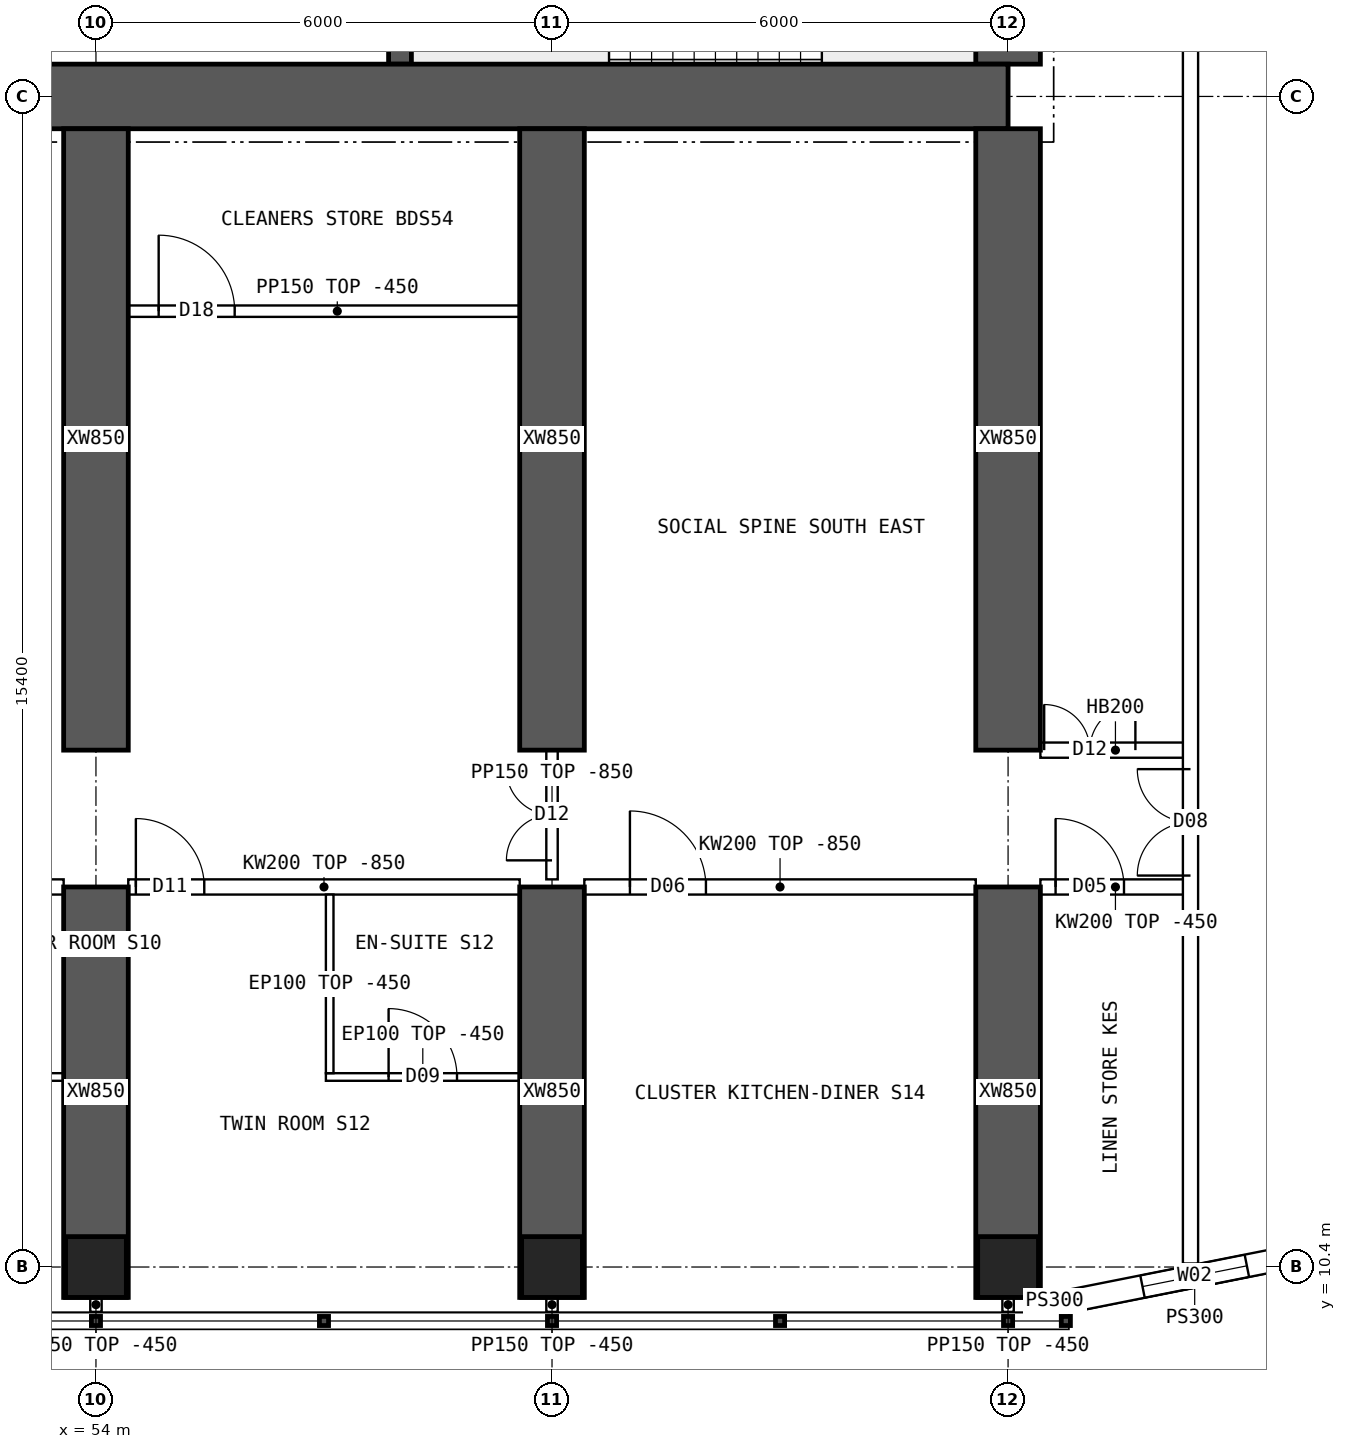
"""IFC4 building model, lengths in metres.
Left out: names, types, materials, properties, quantities, classifications, styles, units other than length and angle.
Written with IfcOpenShell. Run it as: python <this file> out.ifc"""

import sys

from ifc_helpers import new_model, si_unit, direction, frame, frame_2d, origin, origin_2d, place, context, subcontext, project, spatial, polyline, rectangle, hollow_rectangle, outline, extrude, element, fill, save


model = new_model("IFC4")
c1 = context("Model", 3, precision=1e-05, world=origin(), true_north=direction((0.0, 1.0)))
c2 = subcontext(c1, "Body", "Model", "MODEL_VIEW")
j1 = project(units=[si_unit("LENGTHUNIT", "METRE"), si_unit("PLANEANGLEUNIT", "RADIAN")], contexts=[c1])
p1 = place(None, origin())
s1 = spatial("IfcSite", under=j1, at=p1, CompositionType="ELEMENT")
p2 = place(p1, origin())
s2 = spatial("IfcBuilding", under=s1, at=p2, CompositionType="ELEMENT")
p3 = place(p2, frame((0.0, 0.0, 144.85)))
s3 = spatial("IfcBuildingStorey", under=s2, at=p3, CompositionType="ELEMENT", Elevation=144.85)
for number, where, z_axis, x_axis in (
    (1, (54.0, 10.4, 0.0), (0.0, 0.0, 1.0), (1.0, 0.0, 0.0)),
    (2, (60.0, 10.4, 0.0), (0.0, 0.0, 1.0), (1.0, 0.0, 0.0)),
    (3, (66.0, 10.4, 0.0), (0.0, 0.0, 1.0), (1.0, 0.0, 0.0)),
):
    element("IfcColumn", number, at=place(p3, frame(where, z_axis=z_axis, x_axis=x_axis)), inside=s3, PredefinedType="COLUMN", context=c2, shape_type="SweptSolid", body=[
        extrude(hollow_rectangle(XDim=0.8, YDim=0.8, WallThickness=0.08, at=origin_2d()), origin(), (0.0, 0.0, 1.0), 3.75),
    ])
p4 = place(p3, frame((18.0, 25.8, 0.0), z_axis=(0.0, 0.0, 1.0), x_axis=(1.0, 0.0, 0.0)))
e4 = element("IfcWall", 4, at=p4, inside=s3, PredefinedType="SHEAR", context=c2, shape_type="SweptSolid", body=[
    extrude(rectangle(XDim=48.0, YDim=0.85, at=frame_2d((24.0, 0.0))), origin(), (0.0, 0.0, 1.0), 3.75),
])
p5 = place(p3, frame((66.0, 26.225, 0.0), z_axis=(0.0, 0.0, 1.0), x_axis=(0.0, 1.0, 0.0)))
e5 = element("IfcWall", 5, at=p5, inside=s3, PredefinedType="SHEAR", context=c2, shape_type="SweptSolid", body=[
    extrude(rectangle(XDim=11.55, YDim=0.85, at=frame_2d((5.775, 0.0))), origin(), (0.0, 0.0, 1.0), 3.75),
])
p6 = place(p5, frame((5.075, 0.0, 0.0)))
e6 = element("IfcOpeningElement", 6, at=p6, cuts=e5, PredefinedType="OPENING", context=c2, shape_type="SweptSolid", body=[
    extrude(rectangle(XDim=1.2, YDim=2.1, at=frame_2d((0.6, 1.05))), frame((0.0, 0.435, 0.0), z_axis=(0.0, -1.0, 0.0), x_axis=(1.0, 0.0, 0.0)), (0.0, 0.0, 1.0), 0.87),
])
p7 = place(p3, frame((58.0, 26.225, 0.0), z_axis=(0.0, 0.0, 1.0), x_axis=(0.0, 1.0, 0.0)))
e7 = element("IfcWall", 7, at=p7, inside=s3, PredefinedType="SHEAR", context=c2, shape_type="SweptSolid", body=[
    extrude(rectangle(XDim=4.025, YDim=0.3, at=frame_2d((2.012, 0.0))), origin(), (0.0, 0.0, 1.0), 3.75),
])
p8 = place(p3, frame((54.0, 10.0, 0.0), z_axis=(0.0, 0.0, 1.0), x_axis=(0.0, 1.0, 0.0)))
e8 = element("IfcWall", 8, at=p8, inside=s3, PredefinedType="SHEAR", context=c2, shape_type="SweptSolid", body=[
    extrude(rectangle(XDim=5.4, YDim=0.85, at=frame_2d((2.7, 0.0))), origin(), (0.0, 0.0, 1.0), 3.75),
])
p9 = place(p3, frame((54.0, 17.2, 0.0), z_axis=(0.0, 0.0, 1.0), x_axis=(0.0, 1.0, 0.0)))
e9 = element("IfcWall", 9, at=p9, inside=s3, PredefinedType="SHEAR", context=c2, shape_type="SweptSolid", body=[
    extrude(rectangle(XDim=8.175, YDim=0.85, at=frame_2d((4.087, 0.0))), origin(), (0.0, 0.0, 1.0), 3.75),
])
p10 = place(p3, frame((60.0, 10.0, 0.0), z_axis=(0.0, 0.0, 1.0), x_axis=(0.0, 1.0, 0.0)))
e10 = element("IfcWall", 10, at=p10, inside=s3, PredefinedType="SHEAR", context=c2, shape_type="SweptSolid", body=[
    extrude(rectangle(XDim=5.4, YDim=0.85, at=frame_2d((2.7, 0.0))), origin(), (0.0, 0.0, 1.0), 3.75),
])
p11 = place(p3, frame((60.0, 17.2, 0.0), z_axis=(0.0, 0.0, 1.0), x_axis=(0.0, 1.0, 0.0)))
e11 = element("IfcWall", 11, at=p11, inside=s3, PredefinedType="SHEAR", context=c2, shape_type="SweptSolid", body=[
    extrude(rectangle(XDim=8.175, YDim=0.85, at=frame_2d((4.087, 0.0))), origin(), (0.0, 0.0, 1.0), 3.75),
])
p12 = place(p3, frame((66.0, 10.0, 0.0), z_axis=(0.0, 0.0, 1.0), x_axis=(0.0, 1.0, 0.0)))
e12 = element("IfcWall", 12, at=p12, inside=s3, PredefinedType="SHEAR", context=c2, shape_type="SweptSolid", body=[
    extrude(rectangle(XDim=5.4, YDim=0.85, at=frame_2d((2.7, 0.0))), origin(), (0.0, 0.0, 1.0), 3.75),
])
p13 = place(p3, frame((66.0, 17.2, 0.0), z_axis=(0.0, 0.0, 1.0), x_axis=(0.0, 1.0, 0.0)))
e13 = element("IfcWall", 13, at=p13, inside=s3, PredefinedType="SHEAR", context=c2, shape_type="SweptSolid", body=[
    extrude(rectangle(XDim=8.175, YDim=0.85, at=frame_2d((4.087, 0.0))), origin(), (0.0, 0.0, 1.0), 3.75),
])
p14 = place(p3, frame((66.8, 9.95, 0.0), z_axis=(0.0, 0.0, 1.0), x_axis=(0.98078325777, 0.195100490205, 0.0)))
e14 = element("IfcWall", 14, at=p14, inside=s3, PredefinedType="SOLIDWALL", context=c2, shape_type="SweptSolid", body=[
    extrude(outline(polyline([(-0.03, -0.15), (3.405, -0.15), (3.345, 0.15), (0.03, 0.15), (-0.03, -0.15)])), origin(), (0.0, 0.0, 1.0), 3.3),
])
p15 = place(p14, frame((0.988, 0.0, 0.9)))
e15 = element("IfcOpeningElement", 15, at=p15, cuts=e14, PredefinedType="OPENING", context=c2, shape_type="SweptSolid", body=[
    extrude(rectangle(XDim=1.4, YDim=1.8, at=frame_2d((0.7, 0.9))), frame((0.0, 0.16, 0.0), z_axis=(0.0, -1.0, 0.0), x_axis=(1.0, 0.0, 0.0)), (0.0, 0.0, 1.0), 0.32),
])
p16 = place(p3, frame((66.8, 9.95, 0.0), z_axis=(0.0, 0.0, 1.0), x_axis=(-1.0, 0.0, 0.0)))
e16 = element("IfcWall", 16, at=p16, inside=s3, PredefinedType="SOLIDWALL", context=c2, shape_type="SweptSolid", body=[
    extrude(rectangle(XDim=0.375, YDim=0.3, at=frame_2d((0.188, 0.0))), origin(), (0.0, 0.0, 1.0), 3.3),
])
p17 = place(p3, frame((48.425, 15.4, 0.0), z_axis=(0.0, 0.0, 1.0), x_axis=(1.0, 0.0, 0.0)))
e17 = element("IfcWall", 17, at=p17, inside=s3, PredefinedType="SOLIDWALL", context=c2, shape_type="SweptSolid", body=[
    extrude(outline(polyline([(0.0, 0.0), (5.15, 0.0), (5.15, 2.9), (0.0, 2.9), (0.0, 0.0)])), frame((0.0, 0.1, 0.0), z_axis=(0.0, -1.0, 0.0), x_axis=(1.0, 0.0, 0.0)), (0.0, 0.0, 1.0), 0.2),
])
p18 = place(p17, frame((2.3, 0.0, 0.0)))
e18 = element("IfcOpeningElement", 18, at=p18, cuts=e17, PredefinedType="OPENING", context=c2, shape_type="SweptSolid", body=[
    extrude(rectangle(XDim=0.9, YDim=2.1, at=frame_2d((0.45, 1.05))), frame((0.0, 0.11, 0.0), z_axis=(0.0, -1.0, 0.0), x_axis=(1.0, 0.0, 0.0)), (0.0, 0.0, 1.0), 0.22),
])
p19 = place(p3, frame((54.425, 15.4, 0.0), z_axis=(0.0, 0.0, 1.0), x_axis=(1.0, 0.0, 0.0)))
e19 = element("IfcWall", 19, at=p19, inside=s3, PredefinedType="SOLIDWALL", context=c2, shape_type="SweptSolid", body=[
    extrude(outline(polyline([(0.0, 0.0), (5.15, 0.0), (5.15, 2.9), (0.0, 2.9), (0.0, 0.0)])), frame((0.0, 0.1, 0.0), z_axis=(0.0, -1.0, 0.0), x_axis=(1.0, 0.0, 0.0)), (0.0, 0.0, 1.0), 0.2),
])
p20 = place(p19, frame((0.1, 0.0, 0.0)))
e20 = element("IfcOpeningElement", 20, at=p20, cuts=e19, PredefinedType="OPENING", context=c2, shape_type="SweptSolid", body=[
    extrude(rectangle(XDim=0.9, YDim=2.1, at=frame_2d((0.45, 1.05))), frame((0.0, 0.11, 0.0), z_axis=(0.0, -1.0, 0.0), x_axis=(1.0, 0.0, 0.0)), (0.0, 0.0, 1.0), 0.22),
])
p21 = place(p3, frame((60.425, 15.4, 0.0), z_axis=(0.0, 0.0, 1.0), x_axis=(1.0, 0.0, 0.0)))
e21 = element("IfcWall", 21, at=p21, inside=s3, PredefinedType="SOLIDWALL", context=c2, shape_type="SweptSolid", body=[
    extrude(outline(polyline([(0.0, 0.0), (5.15, 0.0), (5.15, 2.9), (0.0, 2.9), (0.0, 0.0)])), frame((0.0, 0.1, 0.0), z_axis=(0.0, -1.0, 0.0), x_axis=(1.0, 0.0, 0.0)), (0.0, 0.0, 1.0), 0.2),
])
p22 = place(p21, frame((0.6, 0.0, 0.0)))
e22 = element("IfcOpeningElement", 22, at=p22, cuts=e21, PredefinedType="OPENING", context=c2, shape_type="SweptSolid", body=[
    extrude(rectangle(XDim=1.0, YDim=2.1, at=frame_2d((0.5, 1.05))), frame((0.0, 0.11, 0.0), z_axis=(0.0, -1.0, 0.0), x_axis=(1.0, 0.0, 0.0)), (0.0, 0.0, 1.0), 0.22),
])
p23 = place(p3, frame((66.425, 15.4, 0.0), z_axis=(0.0, 0.0, 1.0), x_axis=(1.0, 0.0, 0.0)))
e23 = element("IfcWall", 23, at=p23, inside=s3, PredefinedType="SOLIDWALL", context=c2, shape_type="SweptSolid", body=[
    extrude(rectangle(XDim=1.975, YDim=0.2, at=frame_2d((0.987, 0.0))), origin(), (0.0, 0.0, 1.0), 3.3),
])
p24 = place(p23, frame((0.2, 0.0, 0.0)))
e24 = element("IfcOpeningElement", 24, at=p24, cuts=e23, PredefinedType="OPENING", context=c2, shape_type="SweptSolid", body=[
    extrude(rectangle(XDim=0.9, YDim=2.1, at=frame_2d((0.45, 1.05))), frame((0.0, 0.11, 0.0), z_axis=(0.0, -1.0, 0.0), x_axis=(1.0, 0.0, 0.0)), (0.0, 0.0, 1.0), 0.22),
])
p25 = place(p3, frame((66.425, 17.2, 0.0), z_axis=(0.0, 0.0, 1.0), x_axis=(1.0, 0.0, 0.0)))
e25 = element("IfcWall", 25, at=p25, inside=s3, PredefinedType="SOLIDWALL", context=c2, shape_type="SweptSolid", body=[
    extrude(rectangle(XDim=1.975, YDim=0.2, at=frame_2d((0.987, 0.0))), origin(), (0.0, 0.0, 1.0), 3.3),
])
p26 = place(p25, frame((0.05, 0.0, 0.0)))
e26 = element("IfcOpeningElement", 26, at=p26, cuts=e25, PredefinedType="OPENING", context=c2, shape_type="SweptSolid", body=[
    extrude(rectangle(XDim=1.2, YDim=2.1, at=frame_2d((0.6, 1.05))), frame((0.0, 0.11, 0.0), z_axis=(0.0, -1.0, 0.0), x_axis=(1.0, 0.0, 0.0)), (0.0, 0.0, 1.0), 0.22),
])
p27 = place(p3, frame((53.575, 12.9, 0.0), z_axis=(0.0, 0.0, 1.0), x_axis=(-1.0, 0.0, 0.0)))
e27 = element("IfcWall", 27, at=p27, inside=s3, PredefinedType="PARTITIONING", context=c2, shape_type="SweptSolid", body=[
    extrude(rectangle(XDim=3.0, YDim=0.1, at=frame_2d((1.5, 0.0))), origin(), (0.0, 0.0, 1.0), 3.3),
])
p28 = place(p27, frame((1.95, 0.0, 0.0)))
e28 = element("IfcOpeningElement", 28, at=p28, cuts=e27, PredefinedType="OPENING", context=c2, shape_type="SweptSolid", body=[
    extrude(rectangle(XDim=0.8, YDim=2.1, at=frame_2d((0.4, 1.05))), frame((0.0, 0.06, 0.0), z_axis=(0.0, -1.0, 0.0), x_axis=(1.0, 0.0, 0.0)), (0.0, 0.0, 1.0), 0.12),
])
p29 = place(p3, frame((59.575, 12.9, 0.0), z_axis=(0.0, 0.0, 1.0), x_axis=(-1.0, 0.0, 0.0)))
e29 = element("IfcWall", 29, at=p29, inside=s3, PredefinedType="PARTITIONING", context=c2, shape_type="SweptSolid", body=[
    extrude(rectangle(XDim=2.55, YDim=0.1, at=frame_2d((1.275, 0.0))), origin(), (0.0, 0.0, 1.0), 3.3),
])
p30 = place(p29, frame((0.825, 0.0, 0.0)))
e30 = element("IfcOpeningElement", 30, at=p30, cuts=e29, PredefinedType="OPENING", context=c2, shape_type="SweptSolid", body=[
    extrude(rectangle(XDim=0.9, YDim=2.1, at=frame_2d((0.45, 1.05))), frame((0.0, 0.06, 0.0), z_axis=(0.0, -1.0, 0.0), x_axis=(1.0, 0.0, 0.0)), (0.0, 0.0, 1.0), 0.12),
])
p31 = place(p3, frame((57.075, 12.95, 0.0), z_axis=(0.0, 0.0, 1.0), x_axis=(0.0, 1.0, 0.0)))
e31 = element("IfcWall", 31, at=p31, inside=s3, PredefinedType="PARTITIONING", context=c2, shape_type="SweptSolid", body=[
    extrude(outline(polyline([(0.0, 0.0), (2.35, 0.0), (2.35, 2.9), (2.302, 2.9), (2.3, 3.3), (0.0, 3.3), (0.0, 0.0)])), frame((0.0, 0.05, 0.0), z_axis=(0.0, -1.0, 0.0), x_axis=(1.0, 0.0, 0.0)), (0.0, 0.0, 1.0), 0.1),
])
p32 = place(p3, frame((54.425, 22.975, 0.0), z_axis=(0.0, 0.0, 1.0), x_axis=(1.0, 0.0, 0.0)))
e32 = element("IfcWall", 32, at=p32, inside=s3, PredefinedType="PARTITIONING", context=c2, shape_type="SweptSolid", body=[
    extrude(rectangle(XDim=5.5, YDim=0.15, at=frame_2d((2.75, 0.0))), origin(), (0.0, 0.0, 1.0), 3.3),
])
p33 = place(p32, frame((0.4, 0.0, 0.0)))
e33 = element("IfcOpeningElement", 33, at=p33, cuts=e32, PredefinedType="OPENING", context=c2, shape_type="SweptSolid", body=[
    extrude(rectangle(XDim=1.0, YDim=2.1, at=frame_2d((0.5, 1.05))), frame((0.0, 0.085, 0.0), z_axis=(0.0, -1.0, 0.0), x_axis=(1.0, 0.0, 0.0)), (0.0, 0.0, 1.0), 0.17),
])
p34 = place(p3, frame((60.0, 15.5, 0.0), z_axis=(0.0, 0.0, 1.0), x_axis=(0.0, 1.0, 0.0)))
e34 = element("IfcWall", 34, at=p34, inside=s3, PredefinedType="PARTITIONING", context=c2, shape_type="SweptSolid", body=[
    extrude(outline(polyline([(0.0, 0.0), (1.7, 0.0), (1.7, 2.9), (0.0, 2.9), (0.0, 0.0)])), frame((0.0, 0.075, 0.0), z_axis=(0.0, -1.0, 0.0), x_axis=(1.0, 0.0, 0.0)), (0.0, 0.0, 1.0), 0.15),
])
p35 = place(p34, frame((0.25, 0.0, 0.0)))
e35 = element("IfcOpeningElement", 35, at=p35, cuts=e34, PredefinedType="OPENING", context=c2, shape_type="SweptSolid", body=[
    extrude(rectangle(XDim=1.2, YDim=2.1, at=frame_2d((0.6, 1.05))), frame((0.0, 0.085, 0.0), z_axis=(0.0, -1.0, 0.0), x_axis=(1.0, 0.0, 0.0)), (0.0, 0.0, 1.0), 0.17),
])
p36 = place(p3, frame((68.4, 10.446, 0.0), z_axis=(0.0, 0.0, 1.0), x_axis=(0.0, 1.0, 0.0)))
e36 = element("IfcWall", 36, at=p36, inside=s3, PredefinedType="SOLIDWALL", context=c2, shape_type="SweptSolid", body=[
    extrude(rectangle(XDim=43.107, YDim=0.2, at=frame_2d((21.554, 0.0))), origin(), (0.0, 0.0, 1.0), 3.3),
])
p37 = place(p36, frame((27.994, 0.0, 0.0)))
e37 = element("IfcOpeningElement", 37, at=p37, cuts=e36, PredefinedType="OPENING", context=c2, shape_type="SweptSolid", body=[
    extrude(rectangle(XDim=1.2, YDim=2.1, at=frame_2d((0.6, 1.05))), frame((0.0, 0.11, 0.0), z_axis=(0.0, -1.0, 0.0), x_axis=(1.0, 0.0, 0.0)), (0.0, 0.0, 1.0), 0.22),
])
p38 = place(p36, frame((5.104, 0.0, 0.0)))
e38 = element("IfcOpeningElement", 38, at=p38, cuts=e36, PredefinedType="OPENING", context=c2, shape_type="SweptSolid", body=[
    extrude(rectangle(XDim=1.4, YDim=2.1, at=frame_2d((0.7, 1.05))), frame((0.0, 0.11, 0.0), z_axis=(0.0, -1.0, 0.0), x_axis=(1.0, 0.0, 0.0)), (0.0, 0.0, 1.0), 0.22),
])
p39 = place(p36, frame((36.504, 0.0, 0.0)))
e39 = element("IfcOpeningElement", 39, at=p39, cuts=e36, PredefinedType="OPENING", context=c2, shape_type="SweptSolid", body=[
    extrude(rectangle(XDim=1.4, YDim=2.1, at=frame_2d((0.7, 1.05))), frame((0.0, 0.11, 0.0), z_axis=(0.0, -1.0, 0.0), x_axis=(1.0, 0.0, 0.0)), (0.0, 0.0, 1.0), 0.22),
])
for number, where, z_axis, x_axis in (
    (40, (54.0, 10.0, 0.0), (0.0, 0.0, 1.0), (0.0, -1.0, 0.0)),
    (41, (60.0, 10.0, 0.0), (0.0, 0.0, 1.0), (0.0, -1.0, 0.0)),
    (42, (66.0, 10.0, 0.0), (0.0, 0.0, 1.0), (0.0, -1.0, 0.0)),
):
    element("IfcWall", number, at=place(p3, frame(where, z_axis=z_axis, x_axis=x_axis)), inside=s3, PredefinedType="PARTITIONING", context=c2, shape_type="SweptSolid", body=[
        extrude(rectangle(XDim=0.19, YDim=0.15, at=frame_2d((0.095, 0.0))), origin(), (0.0, 0.0, 1.0), 3.3),
    ])
p40 = place(p15, origin())
e43 = element("IfcWindow", 43, at=p40, inside=s3, PartitioningType="SINGLE_PANEL", PredefinedType="WINDOW", context=c2, shape_type="SweptSolid", body=[
    extrude(rectangle(XDim=1.4, YDim=1.8, at=frame_2d((0.7, 0.9))), frame((0.0, 0.03, 0.0), z_axis=(0.0, -1.0, 0.0), x_axis=(1.0, 0.0, 0.0)), (0.0, 0.0, 1.0), 0.06),
])
fill(e15, e43)
p41 = place(p26, origin())
e44 = element("IfcDoor", 44, at=p41, inside=s3, OperationType="DOUBLE_DOOR_SINGLE_SWING", PredefinedType="DOOR", context=c2, shape_type="SweptSolid", body=[
    extrude(rectangle(XDim=1.2, YDim=2.1, at=frame_2d((0.6, 1.05))), frame((0.0, 0.025, 0.0), z_axis=(0.0, -1.0, 0.0), x_axis=(1.0, 0.0, 0.0)), (0.0, 0.0, 1.0), 0.05),
])
fill(e26, e44)
p42 = place(p30, origin())
e45 = element("IfcDoor", 45, at=p42, inside=s3, OperationType="SINGLE_SWING_RIGHT", PredefinedType="DOOR", context=c2, shape_type="SweptSolid", body=[
    extrude(rectangle(XDim=0.9, YDim=2.1, at=frame_2d((0.45, 1.05))), frame((0.0, 0.025, 0.0), z_axis=(0.0, -1.0, 0.0), x_axis=(1.0, 0.0, 0.0)), (0.0, 0.0, 1.0), 0.05),
])
fill(e30, e45)
p43 = place(p20, origin())
e46 = element("IfcDoor", 46, at=p43, inside=s3, OperationType="SINGLE_SWING_LEFT", PredefinedType="DOOR", context=c2, shape_type="SweptSolid", body=[
    extrude(rectangle(XDim=0.9, YDim=2.1, at=frame_2d((0.45, 1.05))), frame((0.0, 0.025, 0.0), z_axis=(0.0, -1.0, 0.0), x_axis=(1.0, 0.0, 0.0)), (0.0, 0.0, 1.0), 0.05),
])
fill(e20, e46)
p44 = place(p22, origin())
e47 = element("IfcDoor", 47, at=p44, inside=s3, OperationType="SINGLE_SWING_LEFT", PredefinedType="DOOR", context=c2, shape_type="SweptSolid", body=[
    extrude(rectangle(XDim=1.0, YDim=2.1, at=frame_2d((0.5, 1.05))), frame((0.0, 0.025, 0.0), z_axis=(0.0, -1.0, 0.0), x_axis=(1.0, 0.0, 0.0)), (0.0, 0.0, 1.0), 0.05),
])
fill(e22, e47)
p45 = place(p33, origin())
e48 = element("IfcDoor", 48, at=p45, inside=s3, OperationType="SINGLE_SWING_LEFT", PredefinedType="DOOR", context=c2, shape_type="SweptSolid", body=[
    extrude(rectangle(XDim=1.0, YDim=2.1, at=frame_2d((0.5, 1.05))), frame((0.0, 0.025, 0.0), z_axis=(0.0, -1.0, 0.0), x_axis=(1.0, 0.0, 0.0)), (0.0, 0.0, 1.0), 0.05),
])
fill(e33, e48)
p46 = place(p35, origin())
e49 = element("IfcDoor", 49, at=p46, inside=s3, OperationType="DOUBLE_DOOR_SINGLE_SWING", PredefinedType="DOOR", context=c2, shape_type="SweptSolid", body=[
    extrude(rectangle(XDim=1.2, YDim=2.1, at=frame_2d((0.6, 1.05))), frame((0.0, 0.025, 0.0), z_axis=(0.0, -1.0, 0.0), x_axis=(1.0, 0.0, 0.0)), (0.0, 0.0, 1.0), 0.05),
])
fill(e35, e49)
p47 = place(p38, origin())
e50 = element("IfcDoor", 50, at=p47, inside=s3, OperationType="DOUBLE_DOOR_SINGLE_SWING", PredefinedType="DOOR", context=c2, shape_type="SweptSolid", body=[
    extrude(rectangle(XDim=1.4, YDim=2.1, at=frame_2d((0.7, 1.05))), frame((0.0, 0.025, 0.0), z_axis=(0.0, -1.0, 0.0), x_axis=(1.0, 0.0, 0.0)), (0.0, 0.0, 1.0), 0.05),
])
fill(e38, e50)
p48 = place(p24, origin())
e51 = element("IfcDoor", 51, at=p48, inside=s3, OperationType="SINGLE_SWING_LEFT", PredefinedType="DOOR", context=c2, shape_type="SweptSolid", body=[
    extrude(rectangle(XDim=0.9, YDim=2.1, at=frame_2d((0.45, 1.05))), frame((0.0, 0.025, 0.0), z_axis=(0.0, -1.0, 0.0), x_axis=(1.0, 0.0, 0.0)), (0.0, 0.0, 1.0), 0.05),
])
fill(e24, e51)
save(model, sys.argv[1])
